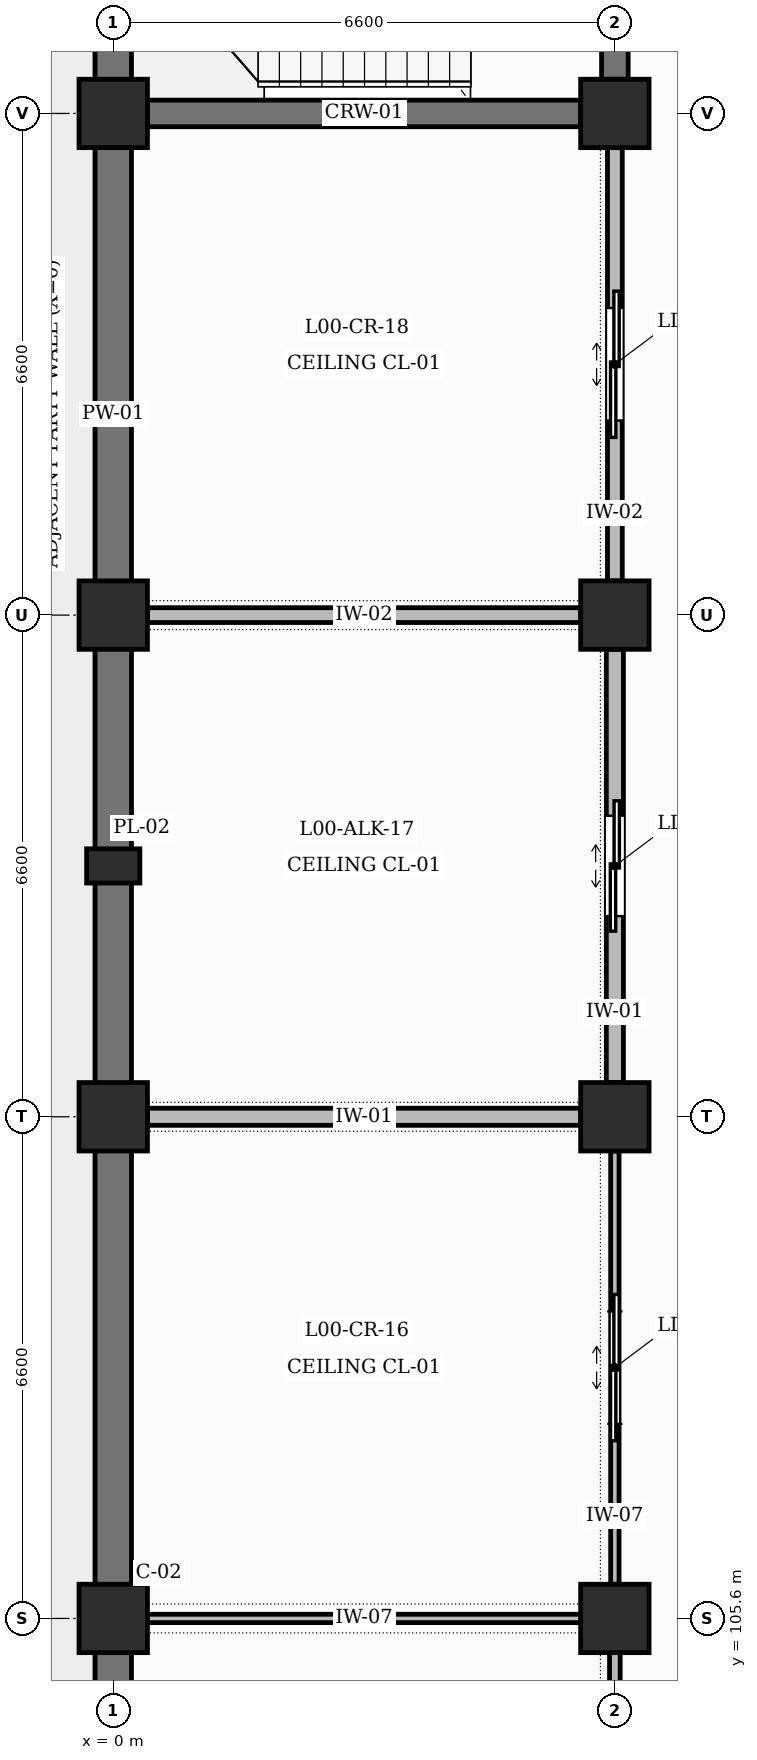
"""IFC4 building model, lengths in metres.
Left out: names, types, materials, properties, quantities, classifications, styles, units other than length and angle.
Written with IfcOpenShell. Run it as: python <this file> out.ifc"""

import sys

from ifc_helpers import new_model, si_unit, direction, frame, frame_2d, origin, origin_2d, place, context, subcontext, project, spatial, rectangle, extrude, element, fill, save


model = new_model("IFC4")
c1 = context("Model", 3, precision=1e-05, world=origin(), true_north=direction((0.0, 1.0)))
c2 = subcontext(c1, "Body", "Model", "MODEL_VIEW")
j1 = project(units=[si_unit("LENGTHUNIT", "METRE"), si_unit("PLANEANGLEUNIT", "RADIAN")], contexts=[c1])
p1 = place(None, origin())
s1 = spatial("IfcSite", under=j1, at=p1, CompositionType="ELEMENT")
p2 = place(p1, origin())
s2 = spatial("IfcBuilding", under=s1, at=p2, CompositionType="ELEMENT")
p3 = place(p2, origin())
s3 = spatial("IfcBuildingStorey", under=s2, at=p3, CompositionType="ELEMENT", Elevation=0.0)
p4 = place(p3, frame((0.0, 115.5, 0.0), z_axis=(0.0, 0.0, 1.0), x_axis=(0.0, 1.0, 0.0)))
e1 = element("IfcColumn", 1, at=p4, inside=s3, PredefinedType="PILASTER", context=c2, shape_type="SweptSolid", body=[
    extrude(rectangle(XDim=0.45, YDim=0.7, at=origin_2d()), origin(), (0.0, 0.0, 1.0), 5.4),
])
for number, where, z_axis, x_axis in (
    (2, (0.0, 105.6, 0.0), (0.0, 0.0, 1.0), (1.0, 0.0, 0.0)),
    (3, (0.0, 112.2, 0.0), (0.0, 0.0, 1.0), (1.0, 0.0, 0.0)),
    (4, (0.0, 118.8, 0.0), (0.0, 0.0, 1.0), (1.0, 0.0, 0.0)),
    (5, (0.0, 125.4, 0.0), (0.0, 0.0, 1.0), (1.0, 0.0, 0.0)),
    (6, (6.6, 105.6, 0.0), (0.0, 0.0, 1.0), (1.0, 0.0, 0.0)),
    (7, (6.6, 112.2, 0.0), (0.0, 0.0, 1.0), (1.0, 0.0, 0.0)),
    (8, (6.6, 118.8, 0.0), (0.0, 0.0, 1.0), (1.0, 0.0, 0.0)),
    (9, (6.6, 125.4, 0.0), (0.0, 0.0, 1.0), (1.0, 0.0, 0.0)),
):
    element("IfcColumn", number, at=place(p3, frame(where, z_axis=z_axis, x_axis=x_axis)), inside=s3, PredefinedType="COLUMN", context=c2, shape_type="SweptSolid", body=[
        extrude(rectangle(XDim=0.9, YDim=0.9, at=origin_2d()), origin(), (0.0, 0.0, 1.0), 5.4),
    ])
for number, where, z_axis, x_axis in (
    (10, (0.0, 99.45, 0.0), (0.0, 0.0, 1.0), (0.0, 1.0, 0.0)),
    (11, (0.0, 106.05, 0.0), (0.0, 0.0, 1.0), (0.0, 1.0, 0.0)),
):
    element("IfcWall", number, at=place(p3, frame(where, z_axis=z_axis, x_axis=x_axis)), inside=s3, PredefinedType="SOLIDWALL", context=c2, shape_type="SweptSolid", body=[
        extrude(rectangle(XDim=5.7, YDim=0.48, at=frame_2d((2.85, 0.0))), origin(), (0.0, 0.0, 1.0), 4.45),
    ])
p5 = place(p3, frame((0.0, 112.65, 0.0), z_axis=(0.0, 0.0, 1.0), x_axis=(0.0, 1.0, 0.0)))
e12 = element("IfcWall", 12, at=p5, inside=s3, PredefinedType="SOLIDWALL", context=c2, shape_type="SweptSolid", body=[
    extrude(rectangle(XDim=5.7, YDim=0.48, at=frame_2d((2.85, 0.0))), origin(), (0.0, 0.0, 1.0), 4.45),
])
for number, where, z_axis, x_axis in (
    (13, (0.0, 119.25, 0.0), (0.0, 0.0, 1.0), (0.0, 1.0, 0.0)),
    (14, (0.0, 125.85, 0.0), (0.0, 0.0, 1.0), (0.0, 1.0, 0.0)),
):
    element("IfcWall", number, at=place(p3, frame(where, z_axis=z_axis, x_axis=x_axis)), inside=s3, PredefinedType="SOLIDWALL", context=c2, shape_type="SweptSolid", body=[
        extrude(rectangle(XDim=5.7, YDim=0.48, at=frame_2d((2.85, 0.0))), origin(), (0.0, 0.0, 1.0), 4.45),
    ])
p6 = place(p3, frame((0.45, 125.4, 0.0), z_axis=(0.0, 0.0, 1.0), x_axis=(1.0, 0.0, 0.0)))
e15 = element("IfcWall", 15, at=p6, inside=s3, PredefinedType="SHEAR", context=c2, shape_type="SweptSolid", body=[
    extrude(rectangle(XDim=5.7, YDim=0.35, at=frame_2d((2.85, 0.0))), origin(), (0.0, 0.0, 1.0), 4.3),
])
p7 = place(p3, frame((6.6, 125.85, 0.0), z_axis=(0.0, 0.0, 1.0), x_axis=(0.0, 1.0, 0.0)))
e16 = element("IfcWall", 16, at=p7, inside=s3, PredefinedType="SHEAR", context=c2, shape_type="SweptSolid", body=[
    extrude(rectangle(XDim=5.7, YDim=0.35, at=frame_2d((2.85, 0.0))), origin(), (0.0, 0.0, 1.0), 4.3),
])
p8 = place(p7, frame((2.275, 0.0, 0.0)))
e17 = element("IfcOpeningElement", 17, at=p8, cuts=e16, PredefinedType="OPENING", context=c2, shape_type="SweptSolid", body=[
    extrude(rectangle(XDim=1.15, YDim=2.2, at=frame_2d((0.575, 1.1))), frame((0.0, 0.185, 0.0), z_axis=(0.0, -1.0, 0.0), x_axis=(1.0, 0.0, 0.0)), (0.0, 0.0, 1.0), 0.37),
])
p9 = place(p3, frame((6.6, 99.45, 0.0), z_axis=(0.0, 0.0, 1.0), x_axis=(0.0, 1.0, 0.0)))
e18 = element("IfcWall", 18, at=p9, inside=s3, PredefinedType="PARTITIONING", context=c2, shape_type="SweptSolid", body=[
    extrude(rectangle(XDim=5.7, YDim=0.14, at=frame_2d((2.85, 0.0))), origin(), (0.0, 0.0, 1.0), 4.3),
])
p10 = place(p9, frame((2.19, 0.0, 0.0)))
e19 = element("IfcOpeningElement", 19, at=p10, cuts=e18, PredefinedType="OPENING", context=c2, shape_type="SweptSolid", body=[
    extrude(rectangle(XDim=1.32, YDim=2.2, at=frame_2d((0.66, 1.1))), frame((0.0, 0.08, 0.0), z_axis=(0.0, -1.0, 0.0), x_axis=(1.0, 0.0, 0.0)), (0.0, 0.0, 1.0), 0.16),
])
p11 = place(p3, frame((0.45, 105.6, 0.0), z_axis=(0.0, 0.0, 1.0), x_axis=(1.0, 0.0, 0.0)))
e20 = element("IfcWall", 20, at=p11, inside=s3, PredefinedType="PARTITIONING", context=c2, shape_type="SweptSolid", body=[
    extrude(rectangle(XDim=5.7, YDim=0.11, at=frame_2d((2.85, 0.0))), origin(), (0.0, 0.0, 1.0), 4.2),
])
p12 = place(p3, frame((6.6, 106.05, 0.0), z_axis=(0.0, 0.0, 1.0), x_axis=(0.0, 1.0, 0.0)))
e21 = element("IfcWall", 21, at=p12, inside=s3, PredefinedType="PARTITIONING", context=c2, shape_type="SweptSolid", body=[
    extrude(rectangle(XDim=5.7, YDim=0.11, at=frame_2d((2.85, 0.0))), origin(), (0.0, 0.0, 1.0), 4.3),
])
p13 = place(p12, frame((2.11, 0.0, 0.0)))
e22 = element("IfcOpeningElement", 22, at=p13, cuts=e21, PredefinedType="OPENING", context=c2, shape_type="SweptSolid", body=[
    extrude(rectangle(XDim=1.48, YDim=2.25, at=frame_2d((0.74, 1.125))), frame((0.0, 0.065, 0.0), z_axis=(0.0, -1.0, 0.0), x_axis=(1.0, 0.0, 0.0)), (0.0, 0.0, 1.0), 0.13),
])
p14 = place(p3, frame((0.45, 112.2, 0.0), z_axis=(0.0, 0.0, 1.0), x_axis=(1.0, 0.0, 0.0)))
e23 = element("IfcWall", 23, at=p14, inside=s3, PredefinedType="PARTITIONING", context=c2, shape_type="SweptSolid", body=[
    extrude(rectangle(XDim=5.7, YDim=0.225, at=frame_2d((2.85, 0.0))), origin(), (0.0, 0.0, 1.0), 4.3),
])
p15 = place(p3, frame((6.6, 112.65, 0.0), z_axis=(0.0, 0.0, 1.0), x_axis=(0.0, 1.0, 0.0)))
e24 = element("IfcWall", 24, at=p15, inside=s3, PredefinedType="PARTITIONING", context=c2, shape_type="SweptSolid", body=[
    extrude(rectangle(XDim=5.7, YDim=0.225, at=frame_2d((2.85, 0.0))), origin(), (0.0, 0.0, 1.0), 4.3),
])
p16 = place(p15, frame((2.19, 0.0, 0.0)))
e25 = element("IfcOpeningElement", 25, at=p16, cuts=e24, PredefinedType="OPENING", context=c2, shape_type="SweptSolid", body=[
    extrude(rectangle(XDim=1.32, YDim=2.2, at=frame_2d((0.66, 1.1))), frame((0.0, 0.123, 0.0), z_axis=(0.0, -1.0, 0.0), x_axis=(1.0, 0.0, 0.0)), (0.0, 0.0, 1.0), 0.245),
])
p17 = place(p3, frame((0.45, 118.8, 0.0), z_axis=(0.0, 0.0, 1.0), x_axis=(1.0, 0.0, 0.0)))
e26 = element("IfcWall", 26, at=p17, inside=s3, PredefinedType="PARTITIONING", context=c2, shape_type="SweptSolid", body=[
    extrude(rectangle(XDim=5.7, YDim=0.195, at=frame_2d((2.85, 0.0))), origin(), (0.0, 0.0, 1.0), 4.2),
])
p18 = place(p3, frame((6.6, 119.25, 0.0), z_axis=(0.0, 0.0, 1.0), x_axis=(0.0, 1.0, 0.0)))
e27 = element("IfcWall", 27, at=p18, inside=s3, PredefinedType="PARTITIONING", context=c2, shape_type="SweptSolid", body=[
    extrude(rectangle(XDim=5.7, YDim=0.195, at=frame_2d((2.85, 0.0))), origin(), (0.0, 0.0, 1.0), 4.3),
])
p19 = place(p18, frame((2.11, 0.0, 0.0)))
e28 = element("IfcOpeningElement", 28, at=p19, cuts=e27, PredefinedType="OPENING", context=c2, shape_type="SweptSolid", body=[
    extrude(rectangle(XDim=1.48, YDim=2.25, at=frame_2d((0.74, 1.125))), frame((0.0, 0.107, 0.0), z_axis=(0.0, -1.0, 0.0), x_axis=(1.0, 0.0, 0.0)), (0.0, 0.0, 1.0), 0.215),
])
p20 = place(p13, origin())
e29 = element("IfcDoor", 29, at=p20, inside=s3, OperationType="DOUBLE_DOOR_SLIDING", PredefinedType="USERDEFINED", context=c2, shape_type="SweptSolid", body=[
    extrude(rectangle(XDim=1.48, YDim=2.25, at=frame_2d((0.74, 1.125))), frame((0.0, 0.025, 0.0), z_axis=(0.0, -1.0, 0.0), x_axis=(1.0, 0.0, 0.0)), (0.0, 0.0, 1.0), 0.05),
])
fill(e22, e29)
p21 = place(p16, origin())
e30 = element("IfcDoor", 30, at=p21, inside=s3, OperationType="DOUBLE_DOOR_SLIDING", PredefinedType="USERDEFINED", context=c2, shape_type="SweptSolid", body=[
    extrude(rectangle(XDim=1.32, YDim=2.2, at=frame_2d((0.66, 1.1))), frame((0.0, 0.025, 0.0), z_axis=(0.0, -1.0, 0.0), x_axis=(1.0, 0.0, 0.0)), (0.0, 0.0, 1.0), 0.05),
])
fill(e25, e30)
p22 = place(p19, origin())
e31 = element("IfcDoor", 31, at=p22, inside=s3, OperationType="DOUBLE_DOOR_SLIDING", PredefinedType="USERDEFINED", context=c2, shape_type="SweptSolid", body=[
    extrude(rectangle(XDim=1.48, YDim=2.25, at=frame_2d((0.74, 1.125))), frame((0.0, 0.025, 0.0), z_axis=(0.0, -1.0, 0.0), x_axis=(1.0, 0.0, 0.0)), (0.0, 0.0, 1.0), 0.05),
])
fill(e28, e31)
save(model, sys.argv[1])
